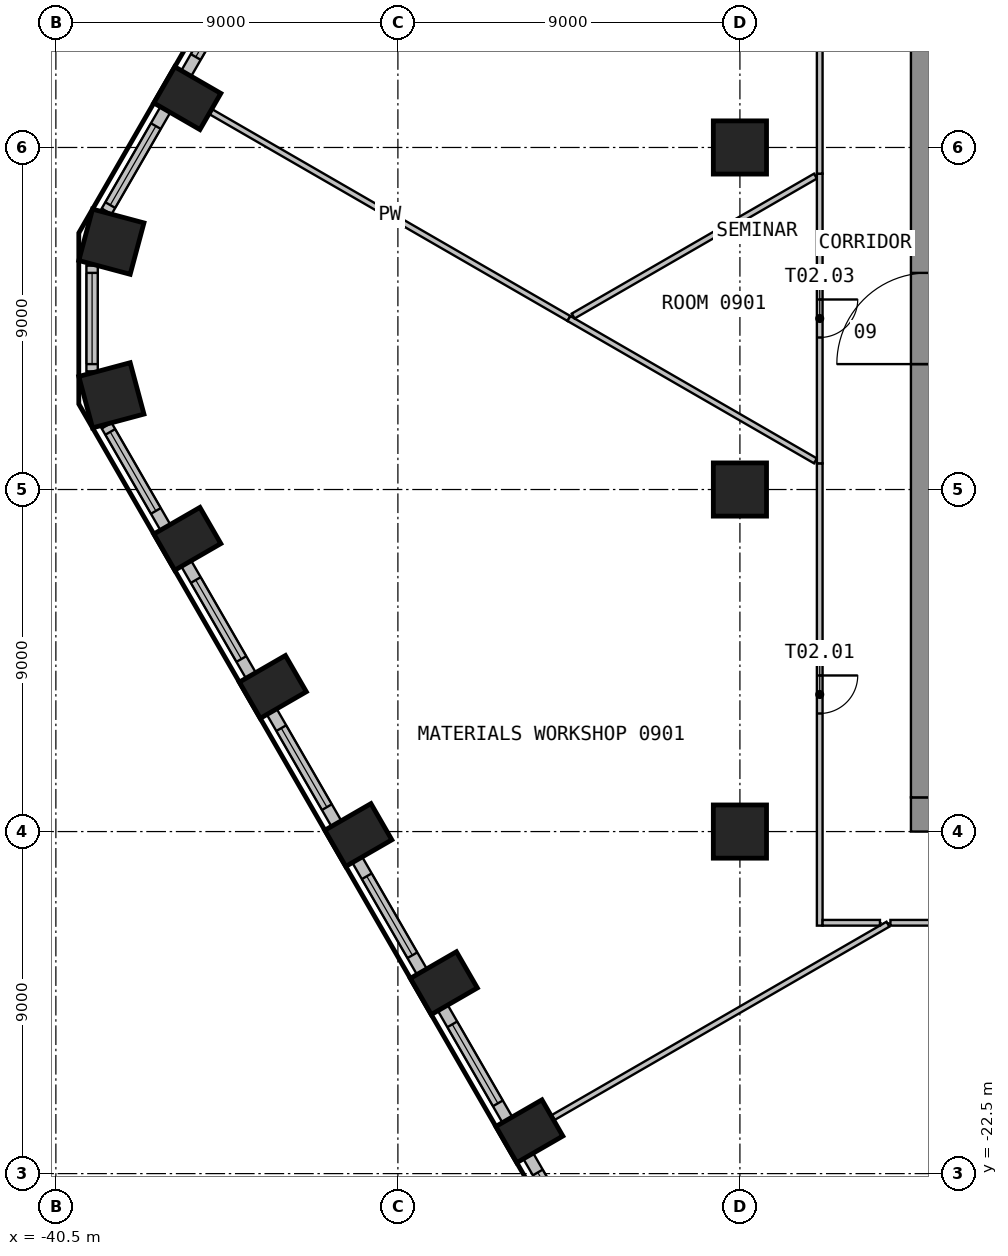
"""IFC4 building model, lengths in metres.
Left out: names, types, materials, properties, quantities, classifications, styles, units other than length and angle.
Written with IfcOpenShell. Run it as: python <this file> out.ifc"""

import sys

from ifc_helpers import new_model, si_unit, direction, frame, frame_2d, origin, origin_2d, place, context, subcontext, project, spatial, rectangle, circle, extrude, element, fill, save


model = new_model("IFC4")
c1 = context("Model", 3, precision=1e-05, world=origin(), true_north=direction((0.0, 1.0)))
c2 = subcontext(c1, "Body", "Model", "MODEL_VIEW")
j1 = project(units=[si_unit("LENGTHUNIT", "METRE"), si_unit("PLANEANGLEUNIT", "RADIAN")], contexts=[c1])
p1 = place(None, origin())
s1 = spatial("IfcSite", under=j1, at=p1, CompositionType="ELEMENT")
p2 = place(p1, origin())
s2 = spatial("IfcBuilding", under=s1, at=p2, CompositionType="ELEMENT")
p3 = place(p2, frame((0.0, 0.0, 41.7)))
s3 = spatial("IfcBuildingStorey", under=s2, at=p3, CompositionType="ELEMENT", Elevation=41.7)
p4 = place(p3, frame((-37.041, 5.797, 0.0), z_axis=(0.0, 0.0, 1.0), x_axis=(-0.5, -0.866025403784, 0.0)))
e1 = element("IfcColumn", 1, at=p4, inside=s3, PredefinedType="COLUMN", context=c2, shape_type="SweptSolid", body=[
    extrude(rectangle(XDim=1.1, YDim=1.4, at=origin_2d()), origin(), (0.0, 0.0, 1.0), 3.525),
])
for number, where, z_axis, x_axis in (
    (2, (-39.04, 2.02, 0.0), (0.0, 0.0, 1.0), (-0.259, -0.966, 0.0)),
    (3, (-39.04, -2.02, 0.0), (0.0, 0.0, 1.0), (0.259, -0.966, 0.0)),
):
    element("IfcColumn", number, at=place(p3, frame(where, z_axis=z_axis, x_axis=x_axis)), inside=s3, PredefinedType="COLUMN", context=c2, shape_type="SweptSolid", body=[
        extrude(rectangle(XDim=1.4, YDim=1.4, at=origin_2d()), origin(), (0.0, 0.0, 1.0), 3.525),
    ])
for number, where, z_axis, x_axis in (
    (4, (-37.041, -5.797, 0.0), (0.0, 0.0, 1.0), (0.5, -0.866, 0.0)),
    (5, (-34.791, -9.694, 0.0), (0.0, 0.0, 1.0), (0.5, -0.866, 0.0)),
    (6, (-32.541, -13.591, 0.0), (0.0, 0.0, 1.0), (0.5, -0.866, 0.0)),
    (7, (-30.291, -17.489, 0.0), (0.0, 0.0, 1.0), (0.5, -0.866, 0.0)),
    (8, (-28.041, -21.385, 0.0), (0.0, 0.0, 1.0), (0.5, -0.866, 0.0)),
):
    element("IfcColumn", number, at=place(p3, frame(where, z_axis=z_axis, x_axis=x_axis)), inside=s3, PredefinedType="COLUMN", context=c2, shape_type="SweptSolid", body=[
        extrude(rectangle(XDim=1.1, YDim=1.4, at=origin_2d()), origin(), (0.0, 0.0, 1.0), 3.525),
    ])
for number, where, z_axis, x_axis in (
    (9, (-22.5, -13.5, 0.0), (0.0, 0.0, 1.0), (1.0, 0.0, 0.0)),
    (10, (-22.5, -4.5, 0.0), (0.0, 0.0, 1.0), (1.0, 0.0, 0.0)),
    (11, (-22.5, 4.5, 0.0), (0.0, 0.0, 1.0), (1.0, 0.0, 0.0)),
):
    element("IfcColumn", number, at=place(p3, frame(where, z_axis=z_axis, x_axis=x_axis)), inside=s3, PredefinedType="COLUMN", context=c2, shape_type="SweptSolid", body=[
        extrude(circle(Radius=0.7, at=origin_2d()), origin(), (0.0, 0.0, 1.0), 3.525),
    ])
p5 = place(p3, frame((-35.369, 9.393, 0.0), z_axis=(0.0, 0.0, 1.0), x_axis=(-0.499993955907, -0.866028893315, 0.0)))
e12 = element("IfcWall", 12, at=p5, inside=s3, PredefinedType="SOLIDWALL", context=c2, shape_type="SweptSolid", body=[
    extrude(rectangle(XDim=3.399, YDim=0.3, at=frame_2d((1.699, 0.0))), origin(), (0.0, 0.0, 1.0), 3.525),
])
p6 = place(p5, frame((0.5, 0.0, 0.9)))
e13 = element("IfcOpeningElement", 13, at=p6, cuts=e12, PredefinedType="OPENING", context=c2, shape_type="SweptSolid", body=[
    extrude(rectangle(XDim=2.4, YDim=2.1, at=frame_2d((1.2, 1.05))), frame((0.0, 0.16, 0.0), z_axis=(0.0, -1.0, 0.0), x_axis=(1.0, 0.0, 0.0)), (0.0, 0.0, 1.0), 0.32),
])
p7 = place(p3, frame((-37.619, 5.495, 0.0), z_axis=(0.0, 0.0, 1.0), x_axis=(-0.49997090907, -0.866042198789, 0.0)))
e14 = element("IfcWall", 14, at=p7, inside=s3, PredefinedType="SOLIDWALL", context=c2, shape_type="SweptSolid", body=[
    extrude(rectangle(XDim=3.091, YDim=0.3, at=frame_2d((1.545, 0.0))), origin(), (0.0, 0.0, 1.0), 3.525),
])
p8 = place(p7, frame((0.5, 0.0, 0.9)))
e15 = element("IfcOpeningElement", 15, at=p8, cuts=e14, PredefinedType="OPENING", context=c2, shape_type="SweptSolid", body=[
    extrude(rectangle(XDim=2.4, YDim=2.1, at=frame_2d((1.2, 1.05))), frame((0.0, 0.16, 0.0), z_axis=(0.0, -1.0, 0.0), x_axis=(1.0, 0.0, 0.0)), (0.0, 0.0, 1.0), 0.32),
])
p9 = place(p3, frame((-39.547, 1.391, 0.0), z_axis=(0.0, 0.0, 1.0), x_axis=(0.0, -1.0, 0.0)))
e16 = element("IfcWall", 16, at=p9, inside=s3, PredefinedType="SOLIDWALL", context=c2, shape_type="SweptSolid", body=[
    extrude(rectangle(XDim=2.782, YDim=0.3, at=frame_2d((1.391, 0.0))), origin(), (0.0, 0.0, 1.0), 3.525),
])
p10 = place(p9, frame((0.191, 0.0, 0.9)))
e17 = element("IfcOpeningElement", 17, at=p10, cuts=e16, PredefinedType="OPENING", context=c2, shape_type="SweptSolid", body=[
    extrude(rectangle(XDim=2.4, YDim=2.1, at=frame_2d((1.2, 1.05))), frame((0.0, 0.16, 0.0), z_axis=(0.0, -1.0, 0.0), x_axis=(1.0, 0.0, 0.0)), (0.0, 0.0, 1.0), 0.32),
])
p11 = place(p3, frame((-39.165, -2.819, 0.0), z_axis=(0.0, 0.0, 1.0), x_axis=(0.49997090907, -0.866042198789, 0.0)))
e18 = element("IfcWall", 18, at=p11, inside=s3, PredefinedType="SOLIDWALL", context=c2, shape_type="SweptSolid", body=[
    extrude(rectangle(XDim=3.091, YDim=0.3, at=frame_2d((1.545, 0.0))), origin(), (0.0, 0.0, 1.0), 3.525),
])
p12 = place(p11, frame((0.191, 0.0, 0.9)))
e19 = element("IfcOpeningElement", 19, at=p12, cuts=e18, PredefinedType="OPENING", context=c2, shape_type="SweptSolid", body=[
    extrude(rectangle(XDim=2.4, YDim=2.1, at=frame_2d((1.2, 1.05))), frame((0.0, 0.16, 0.0), z_axis=(0.0, -1.0, 0.0), x_axis=(1.0, 0.0, 0.0)), (0.0, 0.0, 1.0), 0.32),
])
p13 = place(p3, frame((-37.069, -6.449, 0.0), z_axis=(0.0, 0.0, 1.0), x_axis=(0.499993955907, -0.866028893315, 0.0)))
e20 = element("IfcWall", 20, at=p13, inside=s3, PredefinedType="SOLIDWALL", context=c2, shape_type="SweptSolid", body=[
    extrude(rectangle(XDim=3.399, YDim=0.3, at=frame_2d((1.699, 0.0))), origin(), (0.0, 0.0, 1.0), 3.525),
])
p14 = place(p13, frame((0.5, 0.0, 0.9)))
e21 = element("IfcOpeningElement", 21, at=p14, cuts=e20, PredefinedType="OPENING", context=c2, shape_type="SweptSolid", body=[
    extrude(rectangle(XDim=2.4, YDim=2.1, at=frame_2d((1.2, 1.05))), frame((0.0, 0.16, 0.0), z_axis=(0.0, -1.0, 0.0), x_axis=(1.0, 0.0, 0.0)), (0.0, 0.0, 1.0), 0.32),
])
p15 = place(p3, frame((-34.819, -10.346, 0.0), z_axis=(0.0, 0.0, 1.0), x_axis=(0.499993955907, -0.866028893315, 0.0)))
e22 = element("IfcWall", 22, at=p15, inside=s3, PredefinedType="SOLIDWALL", context=c2, shape_type="SweptSolid", body=[
    extrude(rectangle(XDim=3.399, YDim=0.3, at=frame_2d((1.699, 0.0))), origin(), (0.0, 0.0, 1.0), 3.525),
])
p16 = place(p15, frame((0.5, 0.0, 0.9)))
e23 = element("IfcOpeningElement", 23, at=p16, cuts=e22, PredefinedType="OPENING", context=c2, shape_type="SweptSolid", body=[
    extrude(rectangle(XDim=2.4, YDim=2.1, at=frame_2d((1.2, 1.05))), frame((0.0, 0.16, 0.0), z_axis=(0.0, -1.0, 0.0), x_axis=(1.0, 0.0, 0.0)), (0.0, 0.0, 1.0), 0.32),
])
p17 = place(p3, frame((-32.569, -14.243, 0.0), z_axis=(0.0, 0.0, 1.0), x_axis=(0.499993955907, -0.866028893315, 0.0)))
e24 = element("IfcWall", 24, at=p17, inside=s3, PredefinedType="SOLIDWALL", context=c2, shape_type="SweptSolid", body=[
    extrude(rectangle(XDim=3.399, YDim=0.3, at=frame_2d((1.699, 0.0))), origin(), (0.0, 0.0, 1.0), 3.525),
])
p18 = place(p17, frame((0.5, 0.0, 0.9)))
e25 = element("IfcOpeningElement", 25, at=p18, cuts=e24, PredefinedType="OPENING", context=c2, shape_type="SweptSolid", body=[
    extrude(rectangle(XDim=2.4, YDim=2.1, at=frame_2d((1.2, 1.05))), frame((0.0, 0.16, 0.0), z_axis=(0.0, -1.0, 0.0), x_axis=(1.0, 0.0, 0.0)), (0.0, 0.0, 1.0), 0.32),
])
p19 = place(p3, frame((-30.319, -18.14, 0.0), z_axis=(0.0, 0.0, 1.0), x_axis=(0.499993955907, -0.866028893315, 0.0)))
e26 = element("IfcWall", 26, at=p19, inside=s3, PredefinedType="SOLIDWALL", context=c2, shape_type="SweptSolid", body=[
    extrude(rectangle(XDim=3.399, YDim=0.3, at=frame_2d((1.699, 0.0))), origin(), (0.0, 0.0, 1.0), 3.525),
])
p20 = place(p19, frame((0.5, 0.0, 0.9)))
e27 = element("IfcOpeningElement", 27, at=p20, cuts=e26, PredefinedType="OPENING", context=c2, shape_type="SweptSolid", body=[
    extrude(rectangle(XDim=2.4, YDim=2.1, at=frame_2d((1.2, 1.05))), frame((0.0, 0.16, 0.0), z_axis=(0.0, -1.0, 0.0), x_axis=(1.0, 0.0, 0.0)), (0.0, 0.0, 1.0), 0.32),
])
p21 = place(p3, frame((-28.069, -22.037, 0.0), z_axis=(0.0, 0.0, 1.0), x_axis=(0.499993955907, -0.866028893315, 0.0)))
e28 = element("IfcWall", 28, at=p21, inside=s3, PredefinedType="SOLIDWALL", context=c2, shape_type="SweptSolid", body=[
    extrude(rectangle(XDim=3.399, YDim=0.3, at=frame_2d((1.699, 0.0))), origin(), (0.0, 0.0, 1.0), 3.525),
])
p22 = place(p21, frame((0.5, 0.0, 0.9)))
e29 = element("IfcOpeningElement", 29, at=p22, cuts=e28, PredefinedType="OPENING", context=c2, shape_type="SweptSolid", body=[
    extrude(rectangle(XDim=2.4, YDim=2.1, at=frame_2d((1.2, 1.05))), frame((0.0, 0.16, 0.0), z_axis=(0.0, -1.0, 0.0), x_axis=(1.0, 0.0, 0.0)), (0.0, 0.0, 1.0), 0.32),
])
p23 = place(p3, frame((-18.0, -13.05, 0.0), z_axis=(0.0, 0.0, 1.0), x_axis=(1.0, 0.0, 0.0)))
e30 = element("IfcWall", 30, at=p23, inside=s3, PredefinedType="SHEAR", context=c2, shape_type="SweptSolid", body=[
    extrude(rectangle(XDim=36.0, YDim=0.9, at=frame_2d((18.0, 0.0))), origin(), (0.0, 0.0, 1.0), 3.525),
])
p24 = place(p23, frame((16.8, 0.0, 0.0)))
e31 = element("IfcOpeningElement", 31, at=p24, cuts=e30, PredefinedType="OPENING", context=c2, shape_type="SweptSolid", body=[
    extrude(rectangle(XDim=2.4, YDim=2.1, at=frame_2d((1.2, 1.05))), frame((0.0, 0.46, 0.0), z_axis=(0.0, -1.0, 0.0), x_axis=(1.0, 0.0, 0.0)), (0.0, 0.0, 1.0), 0.92),
])
p25 = place(p23, frame((5.55, 0.0, 0.0)))
e32 = element("IfcOpeningElement", 32, at=p25, cuts=e30, PredefinedType="OPENING", context=c2, shape_type="SweptSolid", body=[
    extrude(rectangle(XDim=1.2, YDim=2.1, at=frame_2d((0.6, 1.05))), frame((0.0, 0.46, 0.0), z_axis=(0.0, -1.0, 0.0), x_axis=(1.0, 0.0, 0.0)), (0.0, 0.0, 1.0), 0.92),
])
p26 = place(p23, frame((29.25, 0.0, 0.0)))
e33 = element("IfcOpeningElement", 33, at=p26, cuts=e30, PredefinedType="OPENING", context=c2, shape_type="SweptSolid", body=[
    extrude(rectangle(XDim=1.2, YDim=2.1, at=frame_2d((0.6, 1.05))), frame((0.0, 0.46, 0.0), z_axis=(0.0, -1.0, 0.0), x_axis=(1.0, 0.0, 0.0)), (0.0, 0.0, 1.0), 0.92),
])
p27 = place(p3, frame((-17.55, -12.6, 0.0), z_axis=(0.0, 0.0, 1.0), x_axis=(0.0, 1.0, 0.0)))
e34 = element("IfcWall", 34, at=p27, inside=s3, PredefinedType="SHEAR", context=c2, shape_type="SweptSolid", body=[
    extrude(rectangle(XDim=25.2, YDim=0.9, at=frame_2d((12.6, 0.0))), origin(), (0.0, 0.0, 1.0), 3.525),
])
p28 = place(p27, frame((11.4, 0.0, 0.0)))
e35 = element("IfcOpeningElement", 35, at=p28, cuts=e34, PredefinedType="OPENING", context=c2, shape_type="SweptSolid", body=[
    extrude(rectangle(XDim=2.4, YDim=2.1, at=frame_2d((1.2, 1.05))), frame((0.0, 0.46, 0.0), z_axis=(0.0, -1.0, 0.0), x_axis=(1.0, 0.0, 0.0)), (0.0, 0.0, 1.0), 0.92),
])
p29 = place(p3, frame((-36.417, 5.437, 0.0), z_axis=(0.0, 0.0, 1.0), x_axis=(0.866016964551, -0.500014616896, 0.0)))
e36 = element("IfcWall", 36, at=p29, inside=s3, PredefinedType="PARTITIONING", context=c2, shape_type="SweptSolid", body=[
    extrude(rectangle(XDim=10.874, YDim=0.15, at=frame_2d((5.437, 0.0))), origin(), (0.0, 0.0, 1.0), 3.525),
])
p30 = place(p3, frame((-18.605, -15.938, 0.0), z_axis=(0.0, 0.0, 1.0), x_axis=(-0.86599299422, -0.500056130812, 0.0)))
e37 = element("IfcWall", 37, at=p30, inside=s3, PredefinedType="PARTITIONING", context=c2, shape_type="SweptSolid", body=[
    extrude(rectangle(XDim=10.176, YDim=0.15, at=frame_2d((5.088, 0.0))), origin(), (0.0, 0.0, 1.0), 3.525),
])
p31 = place(p3, frame((-27.0, 0.0, 0.0), z_axis=(0.0, 0.0, 1.0), x_axis=(0.865996173008, -0.500050625772, 0.0)))
e38 = element("IfcWall", 38, at=p31, inside=s3, PredefinedType="PARTITIONING", context=c2, shape_type="SweptSolid", body=[
    extrude(rectangle(XDim=7.491, YDim=0.15, at=frame_2d((3.746, 0.0))), origin(), (0.0, 0.0, 1.0), 3.525),
])
p32 = place(p3, frame((-20.512, 3.746, 0.0), z_axis=(0.0, 0.0, 1.0), x_axis=(-0.865993380977, -0.500055461028, 0.0)))
e39 = element("IfcWall", 39, at=p32, inside=s3, PredefinedType="PARTITIONING", context=c2, shape_type="SweptSolid", body=[
    extrude(rectangle(XDim=7.362, YDim=0.15, at=frame_2d((3.681, 0.0))), origin(), (0.0, 0.0, 1.0), 3.525),
])
p33 = place(p3, frame((-20.4, -3.811, 0.0), z_axis=(0.0, 0.0, 1.0), x_axis=(0.0, -1.0, 0.0)))
e40 = element("IfcWall", 40, at=p33, inside=s3, PredefinedType="PARTITIONING", context=c2, shape_type="SweptSolid", body=[
    extrude(rectangle(XDim=12.164, YDim=0.15, at=frame_2d((6.082, 0.0))), origin(), (0.0, 0.0, 1.0), 3.525),
])
p34 = place(p33, frame((5.582, 0.0, 0.0)))
e41 = element("IfcOpeningElement", 41, at=p34, cuts=e40, PredefinedType="OPENING", context=c2, shape_type="SweptSolid", body=[
    extrude(rectangle(XDim=1.0, YDim=2.1, at=frame_2d((0.5, 1.05))), frame((0.0, 0.085, 0.0), z_axis=(0.0, -1.0, 0.0), x_axis=(1.0, 0.0, 0.0)), (0.0, 0.0, 1.0), 0.17),
])
p35 = place(p3, frame((-20.325, -15.9, 0.0), z_axis=(0.0, 0.0, 1.0), x_axis=(1.0, 0.0, 0.0)))
e42 = element("IfcWall", 42, at=p35, inside=s3, PredefinedType="PARTITIONING", context=c2, shape_type="SweptSolid", body=[
    extrude(rectangle(XDim=1.51, YDim=0.15, at=frame_2d((0.755, 0.0))), origin(), (0.0, 0.0, 1.0), 3.525),
])
p36 = place(p3, frame((-20.4, 3.811, 0.0), z_axis=(0.0, 0.0, 1.0), x_axis=(0.0, -1.0, 0.0)))
e43 = element("IfcWall", 43, at=p36, inside=s3, PredefinedType="PARTITIONING", context=c2, shape_type="SweptSolid", body=[
    extrude(rectangle(XDim=7.622, YDim=0.15, at=frame_2d((3.811, 0.0))), origin(), (0.0, 0.0, 1.0), 3.525),
])
p37 = place(p36, frame((3.311, 0.0, 0.0)))
e44 = element("IfcOpeningElement", 44, at=p37, cuts=e43, PredefinedType="OPENING", context=c2, shape_type="SweptSolid", body=[
    extrude(rectangle(XDim=1.0, YDim=2.1, at=frame_2d((0.5, 1.05))), frame((0.0, 0.085, 0.0), z_axis=(0.0, -1.0, 0.0), x_axis=(1.0, 0.0, 0.0)), (0.0, 0.0, 1.0), 0.17),
])
p38 = place(p3, frame((-20.4, 15.975, 0.0), z_axis=(0.0, 0.0, 1.0), x_axis=(0.0, -1.0, 0.0)))
e45 = element("IfcWall", 45, at=p38, inside=s3, PredefinedType="PARTITIONING", context=c2, shape_type="SweptSolid", body=[
    extrude(rectangle(XDim=12.164, YDim=0.15, at=frame_2d((6.082, 0.0))), origin(), (0.0, 0.0, 1.0), 3.525),
])
p39 = place(p38, frame((5.582, 0.0, 0.0)))
e46 = element("IfcOpeningElement", 46, at=p39, cuts=e45, PredefinedType="OPENING", context=c2, shape_type="SweptSolid", body=[
    extrude(rectangle(XDim=1.0, YDim=2.1, at=frame_2d((0.5, 1.05))), frame((0.0, 0.085, 0.0), z_axis=(0.0, -1.0, 0.0), x_axis=(1.0, 0.0, 0.0)), (0.0, 0.0, 1.0), 0.17),
])
p40 = place(p3, frame((-18.54, -15.9, 0.0), z_axis=(0.0, 0.0, 1.0), x_axis=(1.0, 0.0, 0.0)))
e47 = element("IfcWall", 47, at=p40, inside=s3, PredefinedType="PARTITIONING", context=c2, shape_type="SweptSolid", body=[
    extrude(rectangle(XDim=7.29, YDim=0.15, at=frame_2d((3.645, 0.0))), origin(), (0.0, 0.0, 1.0), 3.525),
])
p41 = place(p6, origin())
e48 = element("IfcWindow", 48, at=p41, inside=s3, PartitioningType="SINGLE_PANEL", PredefinedType="WINDOW", context=c2, shape_type="SweptSolid", body=[
    extrude(rectangle(XDim=2.4, YDim=2.1, at=frame_2d((1.2, 1.05))), frame((0.0, 0.03, 0.0), z_axis=(0.0, -1.0, 0.0), x_axis=(1.0, 0.0, 0.0)), (0.0, 0.0, 1.0), 0.06),
])
fill(e13, e48)
p42 = place(p8, origin())
e49 = element("IfcWindow", 49, at=p42, inside=s3, PartitioningType="SINGLE_PANEL", PredefinedType="WINDOW", context=c2, shape_type="SweptSolid", body=[
    extrude(rectangle(XDim=2.4, YDim=2.1, at=frame_2d((1.2, 1.05))), frame((0.0, 0.03, 0.0), z_axis=(0.0, -1.0, 0.0), x_axis=(1.0, 0.0, 0.0)), (0.0, 0.0, 1.0), 0.06),
])
fill(e15, e49)
p43 = place(p10, origin())
e50 = element("IfcWindow", 50, at=p43, inside=s3, PartitioningType="SINGLE_PANEL", PredefinedType="WINDOW", context=c2, shape_type="SweptSolid", body=[
    extrude(rectangle(XDim=2.4, YDim=2.1, at=frame_2d((1.2, 1.05))), frame((0.0, 0.03, 0.0), z_axis=(0.0, -1.0, 0.0), x_axis=(1.0, 0.0, 0.0)), (0.0, 0.0, 1.0), 0.06),
])
fill(e17, e50)
p44 = place(p12, origin())
e51 = element("IfcWindow", 51, at=p44, inside=s3, PartitioningType="SINGLE_PANEL", PredefinedType="WINDOW", context=c2, shape_type="SweptSolid", body=[
    extrude(rectangle(XDim=2.4, YDim=2.1, at=frame_2d((1.2, 1.05))), frame((0.0, 0.03, 0.0), z_axis=(0.0, -1.0, 0.0), x_axis=(1.0, 0.0, 0.0)), (0.0, 0.0, 1.0), 0.06),
])
fill(e19, e51)
p45 = place(p14, origin())
e52 = element("IfcWindow", 52, at=p45, inside=s3, PartitioningType="SINGLE_PANEL", PredefinedType="WINDOW", context=c2, shape_type="SweptSolid", body=[
    extrude(rectangle(XDim=2.4, YDim=2.1, at=frame_2d((1.2, 1.05))), frame((0.0, 0.03, 0.0), z_axis=(0.0, -1.0, 0.0), x_axis=(1.0, 0.0, 0.0)), (0.0, 0.0, 1.0), 0.06),
])
fill(e21, e52)
p46 = place(p16, origin())
e53 = element("IfcWindow", 53, at=p46, inside=s3, PartitioningType="SINGLE_PANEL", PredefinedType="WINDOW", context=c2, shape_type="SweptSolid", body=[
    extrude(rectangle(XDim=2.4, YDim=2.1, at=frame_2d((1.2, 1.05))), frame((0.0, 0.03, 0.0), z_axis=(0.0, -1.0, 0.0), x_axis=(1.0, 0.0, 0.0)), (0.0, 0.0, 1.0), 0.06),
])
fill(e23, e53)
p47 = place(p18, origin())
e54 = element("IfcWindow", 54, at=p47, inside=s3, PartitioningType="SINGLE_PANEL", PredefinedType="WINDOW", context=c2, shape_type="SweptSolid", body=[
    extrude(rectangle(XDim=2.4, YDim=2.1, at=frame_2d((1.2, 1.05))), frame((0.0, 0.03, 0.0), z_axis=(0.0, -1.0, 0.0), x_axis=(1.0, 0.0, 0.0)), (0.0, 0.0, 1.0), 0.06),
])
fill(e25, e54)
p48 = place(p20, origin())
e55 = element("IfcWindow", 55, at=p48, inside=s3, PartitioningType="SINGLE_PANEL", PredefinedType="WINDOW", context=c2, shape_type="SweptSolid", body=[
    extrude(rectangle(XDim=2.4, YDim=2.1, at=frame_2d((1.2, 1.05))), frame((0.0, 0.03, 0.0), z_axis=(0.0, -1.0, 0.0), x_axis=(1.0, 0.0, 0.0)), (0.0, 0.0, 1.0), 0.06),
])
fill(e27, e55)
p49 = place(p22, origin())
e56 = element("IfcWindow", 56, at=p49, inside=s3, PartitioningType="SINGLE_PANEL", PredefinedType="WINDOW", context=c2, shape_type="SweptSolid", body=[
    extrude(rectangle(XDim=2.4, YDim=2.1, at=frame_2d((1.2, 1.05))), frame((0.0, 0.03, 0.0), z_axis=(0.0, -1.0, 0.0), x_axis=(1.0, 0.0, 0.0)), (0.0, 0.0, 1.0), 0.06),
])
fill(e29, e56)
p50 = place(p28, origin())
e57 = element("IfcDoor", 57, at=p50, inside=s3, OperationType="DOUBLE_DOOR_DOUBLE_SWING", PredefinedType="DOOR", context=c2, shape_type="SweptSolid", body=[
    extrude(rectangle(XDim=2.4, YDim=2.1, at=frame_2d((1.2, 1.05))), frame((0.0, 0.025, 0.0), z_axis=(0.0, -1.0, 0.0), x_axis=(1.0, 0.0, 0.0)), (0.0, 0.0, 1.0), 0.05),
])
fill(e35, e57)
p51 = place(p34, origin())
e58 = element("IfcDoor", 58, at=p51, inside=s3, OperationType="SINGLE_SWING_RIGHT", PredefinedType="DOOR", context=c2, shape_type="SweptSolid", body=[
    extrude(rectangle(XDim=1.0, YDim=2.1, at=frame_2d((0.5, 1.05))), frame((0.0, 0.025, 0.0), z_axis=(0.0, -1.0, 0.0), x_axis=(1.0, 0.0, 0.0)), (0.0, 0.0, 1.0), 0.05),
])
fill(e41, e58)
p52 = place(p37, origin())
e59 = element("IfcDoor", 59, at=p52, inside=s3, OperationType="SINGLE_SWING_RIGHT", PredefinedType="DOOR", context=c2, shape_type="SweptSolid", body=[
    extrude(rectangle(XDim=1.0, YDim=2.1, at=frame_2d((0.5, 1.05))), frame((0.0, 0.025, 0.0), z_axis=(0.0, -1.0, 0.0), x_axis=(1.0, 0.0, 0.0)), (0.0, 0.0, 1.0), 0.05),
])
fill(e44, e59)
save(model, sys.argv[1])
